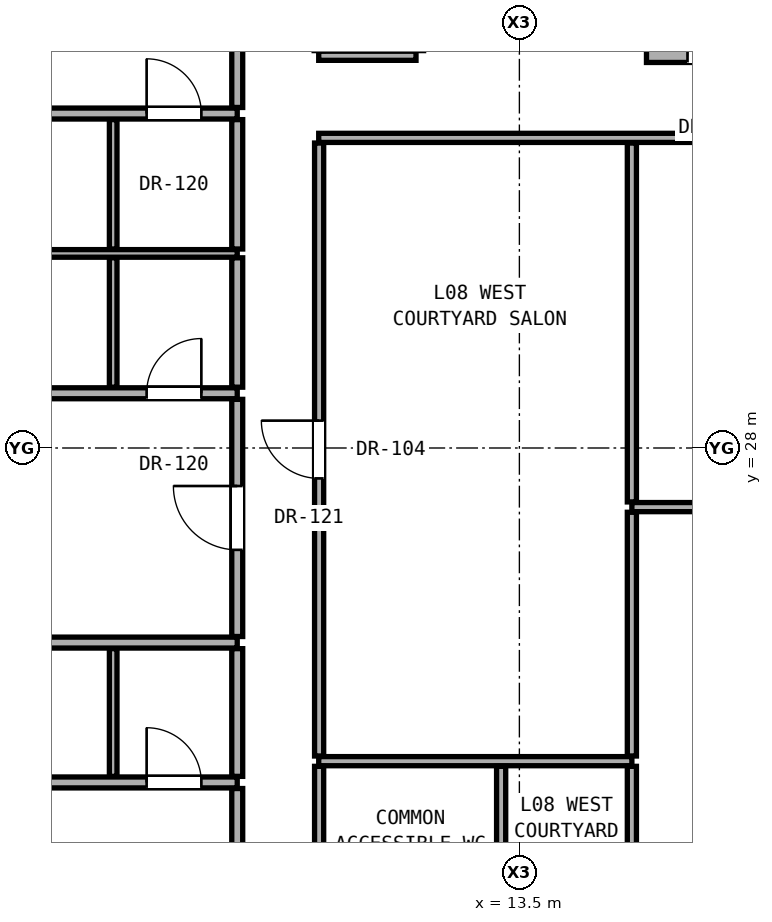
"""IFC4 building model, lengths in metres.
Left out: names, types, materials, properties, quantities, classifications, styles, units other than length and angle.
Written with IfcOpenShell. Run it as: python <this file> out.ifc"""

import sys

from ifc_helpers import new_model, si_unit, direction, frame, frame_2d, origin, place, context, subcontext, project, spatial, rectangle, extrude, element, fill, save


model = new_model("IFC4")
c1 = context("Model", 3, precision=1e-05, world=origin(), true_north=direction((0.0, 1.0)))
c2 = subcontext(c1, "Body", "Model", "MODEL_VIEW")
j1 = project(units=[si_unit("LENGTHUNIT", "METRE"), si_unit("PLANEANGLEUNIT", "RADIAN")], contexts=[c1])
p1 = place(None, origin())
s1 = spatial("IfcSite", under=j1, at=p1, CompositionType="ELEMENT")
p2 = place(p1, origin())
s2 = spatial("IfcBuilding", under=s1, at=p2, CompositionType="ELEMENT")
p3 = place(p2, frame((0.0, 0.0, 32.3)))
s3 = spatial("IfcBuildingStorey", under=s2, at=p3, CompositionType="ELEMENT", Elevation=32.3)
p4 = place(p3, frame((-1.32, 22.5, 0.0), z_axis=(0.0, 0.0, 1.0), x_axis=(1.0, 0.0, 0.0)))
e1 = element("IfcWall", 1, at=p4, inside=s3, PredefinedType="PARTITIONING", context=c2, shape_type="SweptSolid", body=[
    extrude(rectangle(XDim=10.18, YDim=0.18, at=frame_2d((5.09, 0.0))), origin(), (0.0, 0.0, 1.0), 2.125),
])
p5 = place(p4, frame((3.665, 0.0, 0.0)))
e2 = element("IfcOpeningElement", 2, at=p5, cuts=e1, PredefinedType="OPENING", context=c2, shape_type="SweptSolid", body=[
    extrude(rectangle(XDim=0.85, YDim=2.01, at=frame_2d((0.425, 1.005))), frame((0.0, 0.1, 0.0), z_axis=(0.0, -1.0, 0.0), x_axis=(1.0, 0.0, 0.0)), (0.0, 0.0, 1.0), 0.2),
])
p6 = place(p4, frame((8.69, 0.0, 0.0)))
e3 = element("IfcOpeningElement", 3, at=p6, cuts=e1, PredefinedType="OPENING", context=c2, shape_type="SweptSolid", body=[
    extrude(rectangle(XDim=0.9, YDim=2.1, at=frame_2d((0.45, 1.05))), frame((0.0, 0.1, 0.0), z_axis=(0.0, -1.0, 0.0), x_axis=(1.0, 0.0, 0.0)), (0.0, 0.0, 1.0), 0.2),
])
p7 = place(p3, frame((10.2, 22.85, 0.0), z_axis=(0.0, 0.0, 1.0), x_axis=(1.0, 0.0, 0.0)))
e4 = element("IfcWall", 4, at=p7, inside=s3, PredefinedType="PARTITIONING", context=c2, shape_type="SweptSolid", body=[
    extrude(rectangle(XDim=5.15, YDim=0.15, at=frame_2d((2.575, 0.0))), origin(), (0.0, 0.0, 1.0), 2.104),
])
p8 = place(p3, frame((-1.32, 24.8, 0.0), z_axis=(0.0, 0.0, 1.0), x_axis=(1.0, 0.0, 0.0)))
e5 = element("IfcWall", 5, at=p8, inside=s3, PredefinedType="PARTITIONING", context=c2, shape_type="SweptSolid", body=[
    extrude(rectangle(XDim=10.18, YDim=0.18, at=frame_2d((5.09, 0.0))), origin(), (0.0, 0.0, 1.0), 2.125),
])
p9 = place(p3, frame((15.35, 27.028, 0.0), z_axis=(0.0, 0.0, 1.0), x_axis=(1.0, 0.0, 0.0)))
e6 = element("IfcWall", 6, at=p9, inside=s3, PredefinedType="PARTITIONING", context=c2, shape_type="SweptSolid", body=[
    extrude(rectangle(XDim=15.45, YDim=0.15, at=frame_2d((7.725, 0.0))), origin(), (0.0, 0.0, 1.0), 2.104),
])
p10 = place(p3, frame((-1.32, 28.9, 0.0), z_axis=(0.0, 0.0, 1.0), x_axis=(1.0, 0.0, 0.0)))
e7 = element("IfcWall", 7, at=p10, inside=s3, PredefinedType="PARTITIONING", context=c2, shape_type="SweptSolid", body=[
    extrude(rectangle(XDim=10.18, YDim=0.18, at=frame_2d((5.09, 0.0))), origin(), (0.0, 0.0, 1.0), 2.125),
])
p11 = place(p10, frame((3.665, 0.0, 0.0)))
e8 = element("IfcOpeningElement", 8, at=p11, cuts=e7, PredefinedType="OPENING", context=c2, shape_type="SweptSolid", body=[
    extrude(rectangle(XDim=0.85, YDim=2.01, at=frame_2d((0.425, 1.005))), frame((0.0, 0.1, 0.0), z_axis=(0.0, -1.0, 0.0), x_axis=(1.0, 0.0, 0.0)), (0.0, 0.0, 1.0), 0.2),
])
p12 = place(p10, frame((8.69, 0.0, 0.0)))
e9 = element("IfcOpeningElement", 9, at=p12, cuts=e7, PredefinedType="OPENING", context=c2, shape_type="SweptSolid", body=[
    extrude(rectangle(XDim=0.9, YDim=2.1, at=frame_2d((0.45, 1.05))), frame((0.0, 0.1, 0.0), z_axis=(0.0, -1.0, 0.0), x_axis=(1.0, 0.0, 0.0)), (0.0, 0.0, 1.0), 0.2),
])
p13 = place(p3, frame((-1.32, 31.2, 0.0), z_axis=(0.0, 0.0, 1.0), x_axis=(1.0, 0.0, 0.0)))
e10 = element("IfcWall", 10, at=p13, inside=s3, PredefinedType="PARTITIONING", context=c2, shape_type="SweptSolid", body=[
    extrude(rectangle(XDim=10.18, YDim=0.125, at=frame_2d((5.09, 0.0))), origin(), (0.0, 0.0, 1.0), 2.125),
])
p14 = place(p3, frame((10.2, 33.1, 0.0), z_axis=(0.0, 0.0, 1.0), x_axis=(1.0, 0.0, 0.0)))
e11 = element("IfcWall", 11, at=p14, inside=s3, PredefinedType="PARTITIONING", context=c2, shape_type="SweptSolid", body=[
    extrude(rectangle(XDim=20.6, YDim=0.15, at=frame_2d((10.3, 0.0))), origin(), (0.0, 0.0, 1.0), 2.104),
])
p15 = place(p14, frame((12.43, 0.0, 0.0)))
e12 = element("IfcOpeningElement", 12, at=p15, cuts=e11, PredefinedType="OPENING", context=c2, shape_type="SweptSolid", body=[
    extrude(rectangle(XDim=0.85, YDim=2.01, at=frame_2d((0.425, 1.005))), frame((0.0, 0.085, 0.0), z_axis=(0.0, -1.0, 0.0), x_axis=(1.0, 0.0, 0.0)), (0.0, 0.0, 1.0), 0.17),
])
p16 = place(p3, frame((-1.32, 33.5, 0.0), z_axis=(0.0, 0.0, 1.0), x_axis=(1.0, 0.0, 0.0)))
e13 = element("IfcWall", 13, at=p16, inside=s3, PredefinedType="PARTITIONING", context=c2, shape_type="SweptSolid", body=[
    extrude(rectangle(XDim=10.18, YDim=0.18, at=frame_2d((5.09, 0.0))), origin(), (0.0, 0.0, 1.0), 2.125),
])
p17 = place(p16, frame((3.665, 0.0, 0.0)))
e14 = element("IfcOpeningElement", 14, at=p17, cuts=e13, PredefinedType="OPENING", context=c2, shape_type="SweptSolid", body=[
    extrude(rectangle(XDim=0.85, YDim=2.01, at=frame_2d((0.425, 1.005))), frame((0.0, 0.1, 0.0), z_axis=(0.0, -1.0, 0.0), x_axis=(1.0, 0.0, 0.0)), (0.0, 0.0, 1.0), 0.2),
])
p18 = place(p16, frame((8.69, 0.0, 0.0)))
e15 = element("IfcOpeningElement", 15, at=p18, cuts=e13, PredefinedType="OPENING", context=c2, shape_type="SweptSolid", body=[
    extrude(rectangle(XDim=0.9, YDim=2.1, at=frame_2d((0.45, 1.05))), frame((0.0, 0.1, 0.0), z_axis=(0.0, -1.0, 0.0), x_axis=(1.0, 0.0, 0.0)), (0.0, 0.0, 1.0), 0.2),
])
p19 = place(p3, frame((10.2, 34.45, 0.0), z_axis=(0.0, 0.0, 1.0), x_axis=(1.0, 0.0, 0.0)))
e16 = element("IfcWall", 16, at=p19, inside=s3, PredefinedType="PARTITIONING", context=c2, shape_type="SweptSolid", body=[
    extrude(rectangle(XDim=1.6, YDim=0.15, at=frame_2d((0.8, 0.0))), origin(), (0.0, 0.0, 1.0), 2.104),
])
p20 = place(p3, frame((15.59, 34.45, 0.0), z_axis=(0.0, 0.0, 1.0), x_axis=(1.0, 0.0, 0.0)))
e17 = element("IfcWall", 17, at=p20, inside=s3, PredefinedType="SOLIDWALL", context=c2, shape_type="SweptSolid", body=[
    extrude(rectangle(XDim=15.21, YDim=0.22, at=frame_2d((7.605, 0.0))), origin(), (0.0, 0.0, 1.0), 2.104),
])
p21 = place(p20, frame((6.435, 0.0, 0.0)))
e18 = element("IfcOpeningElement", 18, at=p21, cuts=e17, PredefinedType="OPENING", context=c2, shape_type="SweptSolid", body=[
    extrude(rectangle(XDim=0.85, YDim=2.01, at=frame_2d((0.425, 1.005))), frame((0.0, 0.12, 0.0), z_axis=(0.0, -1.0, 0.0), x_axis=(1.0, 0.0, 0.0)), (0.0, 0.0, 1.0), 0.24),
])
p22 = place(p20, frame((11.135, 0.0, 0.0)))
e19 = element("IfcOpeningElement", 19, at=p22, cuts=e17, PredefinedType="OPENING", context=c2, shape_type="SweptSolid", body=[
    extrude(rectangle(XDim=0.85, YDim=2.01, at=frame_2d((0.425, 1.005))), frame((0.0, 0.12, 0.0), z_axis=(0.0, -1.0, 0.0), x_axis=(1.0, 0.0, 0.0)), (0.0, 0.0, 1.0), 0.24),
])
p23 = place(p20, frame((0.675, 0.0, 0.0)))
e20 = element("IfcOpeningElement", 20, at=p23, cuts=e17, PredefinedType="OPENING", context=c2, shape_type="SweptSolid", body=[
    extrude(rectangle(XDim=0.85, YDim=2.01, at=frame_2d((0.425, 1.005))), frame((0.0, 0.12, 0.0), z_axis=(0.0, -1.0, 0.0), x_axis=(1.0, 0.0, 0.0)), (0.0, 0.0, 1.0), 0.24),
])
p24 = place(p20, frame((2.835, 0.0, 0.0)))
e21 = element("IfcOpeningElement", 21, at=p24, cuts=e17, PredefinedType="OPENING", context=c2, shape_type="SweptSolid", body=[
    extrude(rectangle(XDim=0.85, YDim=2.01, at=frame_2d((0.425, 1.005))), frame((0.0, 0.12, 0.0), z_axis=(0.0, -1.0, 0.0), x_axis=(1.0, 0.0, 0.0)), (0.0, 0.0, 1.0), 0.24),
])
p25 = place(p3, frame((6.82, 22.6, 0.0), z_axis=(0.0, 0.0, 1.0), x_axis=(0.0, 1.0, 0.0)))
e22 = element("IfcWall", 22, at=p25, inside=s3, PredefinedType="PARTITIONING", context=c2, shape_type="SweptSolid", body=[
    extrude(rectangle(XDim=2.1, YDim=0.125, at=frame_2d((1.05, 0.0))), origin(), (0.0, 0.0, 1.0), 2.279),
])
for number, where, z_axis, x_axis in (
    (23, (6.82, 29.0, 0.0), (0.0, 0.0, 1.0), (0.0, 1.0, 0.0)),
    (24, (6.82, 31.272, 0.0), (0.0, 0.0, 1.0), (0.0, 1.0, 0.0)),
):
    element("IfcWall", number, at=place(p3, frame(where, z_axis=z_axis, x_axis=x_axis)), inside=s3, PredefinedType="PARTITIONING", context=c2, shape_type="SweptSolid", body=[
        extrude(rectangle(XDim=2.127, YDim=0.125, at=frame_2d((1.064, 0.0))), origin(), (0.0, 0.0, 1.0), 2.279),
    ])
p26 = place(p3, frame((8.86, 14.206, 0.0), z_axis=(0.0, 0.0, 1.0), x_axis=(0.0, 1.0, 0.0)))
e25 = element("IfcWall", 25, at=p26, inside=s3, PredefinedType="PARTITIONING", context=c2, shape_type="SweptSolid", body=[
    extrude(rectangle(XDim=8.194, YDim=0.18, at=frame_2d((4.097, 0.0))), origin(), (0.0, 0.0, 1.0), 2.436),
])
p27 = place(p26, frame((3.572, 0.0, 0.0)))
e26 = element("IfcOpeningElement", 26, at=p27, cuts=e25, PredefinedType="OPENING", context=c2, shape_type="SweptSolid", body=[
    extrude(rectangle(XDim=1.05, YDim=2.2, at=frame_2d((0.525, 1.1))), frame((0.0, 0.1, 0.0), z_axis=(0.0, -1.0, 0.0), x_axis=(1.0, 0.0, 0.0)), (0.0, 0.0, 1.0), 0.2),
])
p28 = place(p3, frame((8.86, 22.6, 0.0), z_axis=(0.0, 0.0, 1.0), x_axis=(0.0, 1.0, 0.0)))
e27 = element("IfcWall", 27, at=p28, inside=s3, PredefinedType="PARTITIONING", context=c2, shape_type="SweptSolid", body=[
    extrude(rectangle(XDim=2.1, YDim=0.18, at=frame_2d((1.05, 0.0))), origin(), (0.0, 0.0, 1.0), 2.279),
])
p29 = place(p3, frame((8.86, 24.9, 0.0), z_axis=(0.0, 0.0, 1.0), x_axis=(0.0, 1.0, 0.0)))
e28 = element("IfcWall", 28, at=p29, inside=s3, PredefinedType="PARTITIONING", context=c2, shape_type="SweptSolid", body=[
    extrude(rectangle(XDim=3.9, YDim=0.18, at=frame_2d((1.95, 0.0))), origin(), (0.0, 0.0, 1.0), 2.279),
])
p30 = place(p29, frame((1.425, 0.0, 0.0)))
e29 = element("IfcOpeningElement", 29, at=p30, cuts=e28, PredefinedType="OPENING", context=c2, shape_type="SweptSolid", body=[
    extrude(rectangle(XDim=1.05, YDim=2.2, at=frame_2d((0.525, 1.1))), frame((0.0, 0.1, 0.0), z_axis=(0.0, -1.0, 0.0), x_axis=(1.0, 0.0, 0.0)), (0.0, 0.0, 1.0), 0.2),
])
for number, where, z_axis, x_axis in (
    (30, (8.86, 29.0, 0.0), (0.0, 0.0, 1.0), (0.0, 1.0, 0.0)),
    (31, (8.86, 31.272, 0.0), (0.0, 0.0, 1.0), (0.0, 1.0, 0.0)),
):
    element("IfcWall", number, at=place(p3, frame(where, z_axis=z_axis, x_axis=x_axis)), inside=s3, PredefinedType="PARTITIONING", context=c2, shape_type="SweptSolid", body=[
        extrude(rectangle(XDim=2.127, YDim=0.18, at=frame_2d((1.064, 0.0))), origin(), (0.0, 0.0, 1.0), 2.279),
    ])
p31 = place(p3, frame((8.86, 33.6, 0.0), z_axis=(0.0, 0.0, 1.0), x_axis=(0.0, 1.0, 0.0)))
e32 = element("IfcWall", 32, at=p31, inside=s3, PredefinedType="PARTITIONING", context=c2, shape_type="SweptSolid", body=[
    extrude(rectangle(XDim=8.194, YDim=0.18, at=frame_2d((4.097, 0.0))), origin(), (0.0, 0.0, 1.0), 2.436),
])
p32 = place(p31, frame((3.572, 0.0, 0.0)))
e33 = element("IfcOpeningElement", 33, at=p32, cuts=e32, PredefinedType="OPENING", context=c2, shape_type="SweptSolid", body=[
    extrude(rectangle(XDim=1.05, YDim=2.2, at=frame_2d((0.525, 1.1))), frame((0.0, 0.1, 0.0), z_axis=(0.0, -1.0, 0.0), x_axis=(1.0, 0.0, 0.0)), (0.0, 0.0, 1.0), 0.2),
])
p33 = place(p3, frame((10.207, 19.985, 0.0), z_axis=(0.0, 0.0, 1.0), x_axis=(0.0, 1.0, 0.0)))
e34 = element("IfcWall", 34, at=p33, inside=s3, PredefinedType="PARTITIONING", context=c2, shape_type="SweptSolid", body=[
    extrude(rectangle(XDim=2.78, YDim=0.15, at=frame_2d((1.39, 0.0))), origin(), (0.0, 0.0, 1.0), 3.06),
])
p34 = place(p3, frame((10.207, 22.935, 0.0), z_axis=(0.0, 0.0, 1.0), x_axis=(0.0, 1.0, 0.0)))
e35 = element("IfcWall", 35, at=p34, inside=s3, PredefinedType="PARTITIONING", context=c2, shape_type="SweptSolid", body=[
    extrude(rectangle(XDim=10.08, YDim=0.15, at=frame_2d((5.04, 0.0))), origin(), (0.0, 0.0, 1.0), 2.279),
])
p35 = place(p34, frame((4.565, 0.0, 0.0)))
e36 = element("IfcOpeningElement", 36, at=p35, cuts=e35, PredefinedType="OPENING", context=c2, shape_type="SweptSolid", body=[
    extrude(rectangle(XDim=0.95, YDim=2.15, at=frame_2d((0.475, 1.075))), frame((0.0, 0.085, 0.0), z_axis=(0.0, -1.0, 0.0), x_axis=(1.0, 0.0, 0.0)), (0.0, 0.0, 1.0), 0.17),
])
for number, where, z_axis, x_axis in (
    (37, (13.2, 19.985, 0.0), (0.0, 0.0, 1.0), (0.0, 1.0, 0.0)),
    (38, (15.35, 19.985, 0.0), (0.0, 0.0, 1.0), (0.0, 1.0, 0.0)),
):
    element("IfcWall", number, at=place(p3, frame(where, z_axis=z_axis, x_axis=x_axis)), inside=s3, PredefinedType="PARTITIONING", context=c2, shape_type="SweptSolid", body=[
        extrude(rectangle(XDim=2.78, YDim=0.15, at=frame_2d((1.39, 0.0))), origin(), (0.0, 0.0, 1.0), 3.06),
    ])
p36 = place(p3, frame((15.35, 22.935, 0.0), z_axis=(0.0, 0.0, 1.0), x_axis=(0.0, 1.0, 0.0)))
e39 = element("IfcWall", 39, at=p36, inside=s3, PredefinedType="PARTITIONING", context=c2, shape_type="SweptSolid", body=[
    extrude(rectangle(XDim=4.008, YDim=0.15, at=frame_2d((2.004, 0.0))), origin(), (0.0, 0.0, 1.0), 2.104),
])
p37 = place(p3, frame((15.35, 27.113, 0.0), z_axis=(0.0, 0.0, 1.0), x_axis=(0.0, 1.0, 0.0)))
e40 = element("IfcWall", 40, at=p37, inside=s3, PredefinedType="PARTITIONING", context=c2, shape_type="SweptSolid", body=[
    extrude(rectangle(XDim=5.902, YDim=0.15, at=frame_2d((2.951, 0.0))), origin(), (0.0, 0.0, 1.0), 2.104),
])
p38 = place(p23, origin())
e41 = element("IfcDoor", 41, at=p38, inside=s3, OperationType="SINGLE_SWING_RIGHT", PredefinedType="DOOR", context=c2, shape_type="SweptSolid", body=[
    extrude(rectangle(XDim=0.85, YDim=2.01, at=frame_2d((0.425, 1.005))), frame((0.0, 0.025, 0.0), z_axis=(0.0, -1.0, 0.0), x_axis=(1.0, 0.0, 0.0)), (0.0, 0.0, 1.0), 0.05),
])
fill(e20, e41)
p39 = place(p6, origin())
e42 = element("IfcDoor", 42, at=p39, inside=s3, OperationType="SINGLE_SWING_LEFT", PredefinedType="DOOR", context=c2, shape_type="SweptSolid", body=[
    extrude(rectangle(XDim=0.9, YDim=2.1, at=frame_2d((0.45, 1.05))), frame((0.0, 0.025, 0.0), z_axis=(0.0, -1.0, 0.0), x_axis=(1.0, 0.0, 0.0)), (0.0, 0.0, 1.0), 0.05),
])
fill(e3, e42)
p40 = place(p30, origin())
e43 = element("IfcDoor", 43, at=p40, inside=s3, OperationType="SINGLE_SWING_RIGHT", PredefinedType="DOOR", context=c2, shape_type="SweptSolid", body=[
    extrude(rectangle(XDim=1.05, YDim=2.2, at=frame_2d((0.525, 1.1))), frame((0.0, 0.025, 0.0), z_axis=(0.0, -1.0, 0.0), x_axis=(1.0, 0.0, 0.0)), (0.0, 0.0, 1.0), 0.05),
])
fill(e29, e43)
p41 = place(p12, origin())
e44 = element("IfcDoor", 44, at=p41, inside=s3, OperationType="SINGLE_SWING_RIGHT", PredefinedType="DOOR", context=c2, shape_type="SweptSolid", body=[
    extrude(rectangle(XDim=0.9, YDim=2.1, at=frame_2d((0.45, 1.05))), frame((0.0, 0.025, 0.0), z_axis=(0.0, -1.0, 0.0), x_axis=(1.0, 0.0, 0.0)), (0.0, 0.0, 1.0), 0.05),
])
fill(e9, e44)
p42 = place(p18, origin())
e45 = element("IfcDoor", 45, at=p42, inside=s3, OperationType="SINGLE_SWING_LEFT", PredefinedType="DOOR", context=c2, shape_type="SweptSolid", body=[
    extrude(rectangle(XDim=0.9, YDim=2.1, at=frame_2d((0.45, 1.05))), frame((0.0, 0.025, 0.0), z_axis=(0.0, -1.0, 0.0), x_axis=(1.0, 0.0, 0.0)), (0.0, 0.0, 1.0), 0.05),
])
fill(e15, e45)
p43 = place(p35, origin())
e46 = element("IfcDoor", 46, at=p43, inside=s3, OperationType="SINGLE_SWING_RIGHT", PredefinedType="DOOR", context=c2, shape_type="SweptSolid", body=[
    extrude(rectangle(XDim=0.95, YDim=2.15, at=frame_2d((0.475, 1.075))), frame((0.0, 0.025, 0.0), z_axis=(0.0, -1.0, 0.0), x_axis=(1.0, 0.0, 0.0)), (0.0, 0.0, 1.0), 0.05),
])
fill(e36, e46)
save(model, sys.argv[1])
